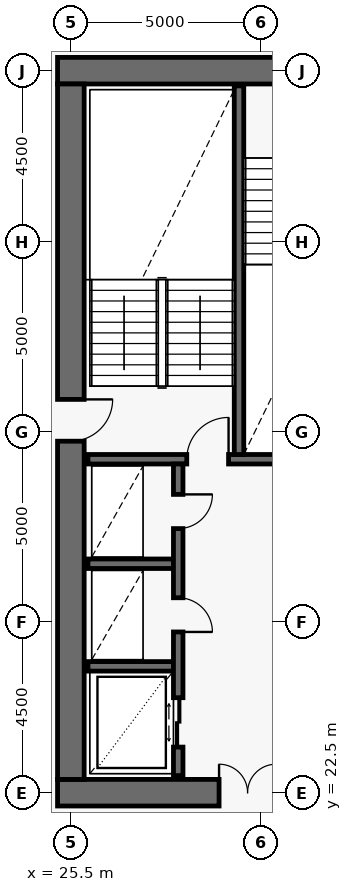
"""IFC4 building model, lengths in metres.
Left out: names, types, materials, properties, quantities, classifications, styles, units other than length and angle.
Written with IfcOpenShell. Run it as: python <this file> out.ifc"""

import sys

from ifc_helpers import new_model, si_unit, direction, frame, frame_2d, origin, place, context, subcontext, project, spatial, rectangle, extrude, element, fill, save


model = new_model("IFC4")
c1 = context("Model", 3, precision=1e-05, world=origin(), true_north=direction((0.0, 1.0)))
c2 = subcontext(c1, "Body", "Model", "MODEL_VIEW")
j1 = project(units=[si_unit("LENGTHUNIT", "METRE"), si_unit("PLANEANGLEUNIT", "RADIAN")], contexts=[c1])
p1 = place(None, origin())
s1 = spatial("IfcSite", under=j1, at=p1, CompositionType="ELEMENT")
p2 = place(p1, origin())
s2 = spatial("IfcBuilding", under=s1, at=p2, CompositionType="ELEMENT")
p3 = place(p2, frame((0.0, 0.0, 207.4)))
s3 = spatial("IfcBuildingStorey", under=s2, at=p3, CompositionType="ELEMENT", Elevation=207.4)
p4 = place(p3, frame((25.15, 22.5, 0.0), z_axis=(0.0, 0.0, 1.0), x_axis=(1.0, 0.0, 0.0)))
e1 = element("IfcWall", 1, at=p4, inside=s3, PredefinedType="SHEAR", context=c2, shape_type="SweptSolid", body=[
    extrude(rectangle(XDim=9.9, YDim=0.7, at=frame_2d((4.95, 0.0))), origin(), (0.0, 0.0, 1.0), 3.8),
])
p5 = place(p4, frame((4.25, 0.0, 0.0)))
e2 = element("IfcOpeningElement", 2, at=p5, cuts=e1, PredefinedType="OPENING", context=c2, shape_type="SweptSolid", body=[
    extrude(rectangle(XDim=1.5, YDim=2.15, at=frame_2d((0.75, 1.075))), frame((0.0, 0.362, 0.0), z_axis=(0.0, -1.0, 0.0), x_axis=(1.0, 0.0, 0.0)), (0.0, 0.0, 1.0), 0.724),
])
p6 = place(p3, frame((36.75, 41.5, 0.0), z_axis=(0.0, 0.0, 1.0), x_axis=(-1.0, 0.0, 0.0)))
e3 = element("IfcWall", 3, at=p6, inside=s3, PredefinedType="SHEAR", context=c2, shape_type="SweptSolid", body=[
    extrude(rectangle(XDim=11.6, YDim=0.7, at=frame_2d((5.8, 0.0))), origin(), (0.0, 0.0, 1.0), 3.8),
])
p7 = place(p6, frame((4.25, 0.0, 0.0)))
e4 = element("IfcOpeningElement", 4, at=p7, cuts=e3, PredefinedType="OPENING", context=c2, shape_type="SweptSolid", body=[
    extrude(rectangle(XDim=1.1, YDim=2.15, at=frame_2d((0.55, 1.075))), frame((0.0, 0.362, 0.0), z_axis=(0.0, -1.0, 0.0), x_axis=(1.0, 0.0, 0.0)), (0.0, 0.0, 1.0), 0.724),
])
p8 = place(p3, frame((25.5, 22.85, 0.0), z_axis=(0.0, 0.0, 1.0), x_axis=(0.0, 1.0, 0.0)))
e5 = element("IfcWall", 5, at=p8, inside=s3, PredefinedType="SHEAR", context=c2, shape_type="SweptSolid", body=[
    extrude(rectangle(XDim=18.3, YDim=0.7, at=frame_2d((9.15, 0.0))), origin(), (0.0, 0.0, 1.0), 3.8),
])
p9 = place(p8, frame((8.9, 0.0, 0.0)))
e6 = element("IfcOpeningElement", 6, at=p9, cuts=e5, PredefinedType="OPENING", context=c2, shape_type="SweptSolid", body=[
    extrude(rectangle(XDim=1.1, YDim=2.15, at=frame_2d((0.55, 1.075))), frame((0.0, 0.362, 0.0), z_axis=(0.0, -1.0, 0.0), x_axis=(1.0, 0.0, 0.0)), (0.0, 0.0, 1.0), 0.724),
])
p10 = place(p3, frame((25.95, 31.275, 0.0), z_axis=(0.0, 0.0, 1.0), x_axis=(1.0, 0.0, 0.0)))
e7 = element("IfcWall", 7, at=p10, inside=s3, PredefinedType="SOLIDWALL", context=c2, shape_type="SweptSolid", body=[
    extrude(rectangle(XDim=20.1, YDim=0.25, at=frame_2d((10.05, 0.0))), origin(), (0.0, 0.0, 1.0), 3.8),
])
p11 = place(p10, frame((2.6, 0.0, 0.0)))
e8 = element("IfcOpeningElement", 8, at=p11, cuts=e7, PredefinedType="OPENING", context=c2, shape_type="SweptSolid", body=[
    extrude(rectangle(XDim=1.1, YDim=2.15, at=frame_2d((0.55, 1.075))), frame((0.0, 0.137, 0.0), z_axis=(0.0, -1.0, 0.0), x_axis=(1.0, 0.0, 0.0)), (0.0, 0.0, 1.0), 0.274),
])
p12 = place(p10, frame((10.6, 0.0, 0.0)))
e9 = element("IfcOpeningElement", 9, at=p12, cuts=e7, PredefinedType="OPENING", context=c2, shape_type="SweptSolid", body=[
    extrude(rectangle(XDim=1.1, YDim=2.15, at=frame_2d((0.55, 1.075))), frame((0.0, 0.137, 0.0), z_axis=(0.0, -1.0, 0.0), x_axis=(1.0, 0.0, 0.0)), (0.0, 0.0, 1.0), 0.274),
])
p13 = place(p10, frame((16.35, 0.0, 0.0)))
e10 = element("IfcOpeningElement", 10, at=p13, cuts=e7, PredefinedType="OPENING", context=c2, shape_type="SweptSolid", body=[
    extrude(rectangle(XDim=1.1, YDim=2.15, at=frame_2d((0.55, 1.075))), frame((0.0, 0.137, 0.0), z_axis=(0.0, -1.0, 0.0), x_axis=(1.0, 0.0, 0.0)), (0.0, 0.0, 1.0), 0.274),
])
p14 = place(p3, frame((29.925, 31.4, 0.0), z_axis=(0.0, 0.0, 1.0), x_axis=(0.0, 1.0, 0.0)))
e11 = element("IfcWall", 11, at=p14, inside=s3, PredefinedType="SOLIDWALL", context=c2, shape_type="SweptSolid", body=[
    extrude(rectangle(XDim=9.7, YDim=0.25, at=frame_2d((4.85, 0.0))), origin(), (0.0, 0.0, 1.0), 3.8),
])
for number, where, z_axis, x_axis in (
    (12, (25.95, 25.825, 0.0), (0.0, 0.0, 1.0), (1.0, 0.0, 0.0)),
    (13, (25.95, 28.525, 0.0), (0.0, 0.0, 1.0), (1.0, 0.0, 0.0)),
):
    element("IfcWall", number, at=place(p3, frame(where, z_axis=z_axis, x_axis=x_axis)), inside=s3, PredefinedType="SOLIDWALL", context=c2, shape_type="SweptSolid", body=[
        extrude(rectangle(XDim=2.25, YDim=0.25, at=frame_2d((1.125, 0.0))), origin(), (0.0, 0.0, 1.0), 3.8),
    ])
p15 = place(p3, frame((28.325, 22.95, 0.0), z_axis=(0.0, 0.0, 1.0), x_axis=(0.0, 1.0, 0.0)))
e14 = element("IfcWall", 14, at=p15, inside=s3, PredefinedType="SOLIDWALL", context=c2, shape_type="SweptSolid", body=[
    extrude(rectangle(XDim=8.2, YDim=0.25, at=frame_2d((4.1, 0.0))), origin(), (0.0, 0.0, 1.0), 3.8),
])
p16 = place(p15, frame((0.75, 0.0, 0.0)))
e15 = element("IfcOpeningElement", 15, at=p16, cuts=e14, PredefinedType="OPENING", context=c2, shape_type="SweptSolid", body=[
    extrude(rectangle(XDim=1.3, YDim=2.3, at=frame_2d((0.65, 1.15))), frame((0.0, 0.137, 0.0), z_axis=(0.0, -1.0, 0.0), x_axis=(1.0, 0.0, 0.0)), (0.0, 0.0, 1.0), 0.274),
])
p17 = place(p15, frame((3.78, 0.0, 0.0)))
e16 = element("IfcOpeningElement", 16, at=p17, cuts=e14, PredefinedType="OPENING", context=c2, shape_type="SweptSolid", body=[
    extrude(rectangle(XDim=0.9, YDim=2.1, at=frame_2d((0.45, 1.05))), frame((0.0, 0.137, 0.0), z_axis=(0.0, -1.0, 0.0), x_axis=(1.0, 0.0, 0.0)), (0.0, 0.0, 1.0), 0.274),
])
p18 = place(p15, frame((6.5, 0.0, 0.0)))
e17 = element("IfcOpeningElement", 17, at=p18, cuts=e14, PredefinedType="OPENING", context=c2, shape_type="SweptSolid", body=[
    extrude(rectangle(XDim=0.9, YDim=2.1, at=frame_2d((0.45, 1.05))), frame((0.0, 0.137, 0.0), z_axis=(0.0, -1.0, 0.0), x_axis=(1.0, 0.0, 0.0)), (0.0, 0.0, 1.0), 0.274),
])
p19 = place(p9, frame((1.1, 0.0, 0.0), z_axis=(0.0, 0.0, 1.0), x_axis=(-1.0, 0.0, 0.0)))
e18 = element("IfcDoor", 18, at=p19, inside=s3, OperationType="SINGLE_SWING_LEFT", PredefinedType="USERDEFINED", context=c2, shape_type="SweptSolid", body=[
    extrude(rectangle(XDim=1.1, YDim=2.15, at=frame_2d((0.55, 1.075))), frame((0.0, 0.025, 0.0), z_axis=(0.0, -1.0, 0.0), x_axis=(1.0, 0.0, 0.0)), (0.0, 0.0, 1.0), 0.05),
])
fill(e6, e18)
p20 = place(p5, origin())
e19 = element("IfcDoor", 19, at=p20, inside=s3, OperationType="DOUBLE_DOOR_SINGLE_SWING", PredefinedType="DOOR", context=c2, shape_type="SweptSolid", body=[
    extrude(rectangle(XDim=1.5, YDim=2.15, at=frame_2d((0.75, 1.075))), frame((0.0, 0.025, 0.0), z_axis=(0.0, -1.0, 0.0), x_axis=(1.0, 0.0, 0.0)), (0.0, 0.0, 1.0), 0.05),
])
fill(e2, e19)
p21 = place(p11, origin())
e20 = element("IfcDoor", 20, at=p21, inside=s3, OperationType="SINGLE_SWING_RIGHT", PredefinedType="USERDEFINED", context=c2, shape_type="SweptSolid", body=[
    extrude(rectangle(XDim=1.1, YDim=2.15, at=frame_2d((0.55, 1.075))), frame((0.0, 0.025, 0.0), z_axis=(0.0, -1.0, 0.0), x_axis=(1.0, 0.0, 0.0)), (0.0, 0.0, 1.0), 0.05),
])
fill(e8, e20)
p22 = place(p16, frame((1.3, 0.0, 0.0), z_axis=(0.0, 0.0, 1.0), x_axis=(-1.0, 0.0, 0.0)))
e21 = element("IfcDoor", 21, at=p22, inside=s3, OperationType="DOUBLE_DOOR_SLIDING", PredefinedType="DOOR", context=c2, shape_type="SweptSolid", body=[
    extrude(rectangle(XDim=1.3, YDim=2.3, at=frame_2d((0.65, 1.15))), frame((0.0, 0.025, 0.0), z_axis=(0.0, -1.0, 0.0), x_axis=(1.0, 0.0, 0.0)), (0.0, 0.0, 1.0), 0.05),
])
fill(e15, e21)
p23 = place(p17, frame((0.9, 0.0, 0.0), z_axis=(0.0, 0.0, 1.0), x_axis=(-1.0, 0.0, 0.0)))
e22 = element("IfcDoor", 22, at=p23, inside=s3, OperationType="SINGLE_SWING_RIGHT", PredefinedType="DOOR", context=c2, shape_type="SweptSolid", body=[
    extrude(rectangle(XDim=0.9, YDim=2.1, at=frame_2d((0.45, 1.05))), frame((0.0, 0.025, 0.0), z_axis=(0.0, -1.0, 0.0), x_axis=(1.0, 0.0, 0.0)), (0.0, 0.0, 1.0), 0.05),
])
fill(e16, e22)
p24 = place(p18, frame((0.9, 0.0, 0.0), z_axis=(0.0, 0.0, 1.0), x_axis=(-1.0, 0.0, 0.0)))
e23 = element("IfcDoor", 23, at=p24, inside=s3, OperationType="SINGLE_SWING_LEFT", PredefinedType="DOOR", context=c2, shape_type="SweptSolid", body=[
    extrude(rectangle(XDim=0.9, YDim=2.1, at=frame_2d((0.45, 1.05))), frame((0.0, 0.025, 0.0), z_axis=(0.0, -1.0, 0.0), x_axis=(1.0, 0.0, 0.0)), (0.0, 0.0, 1.0), 0.05),
])
fill(e17, e23)
save(model, sys.argv[1])
